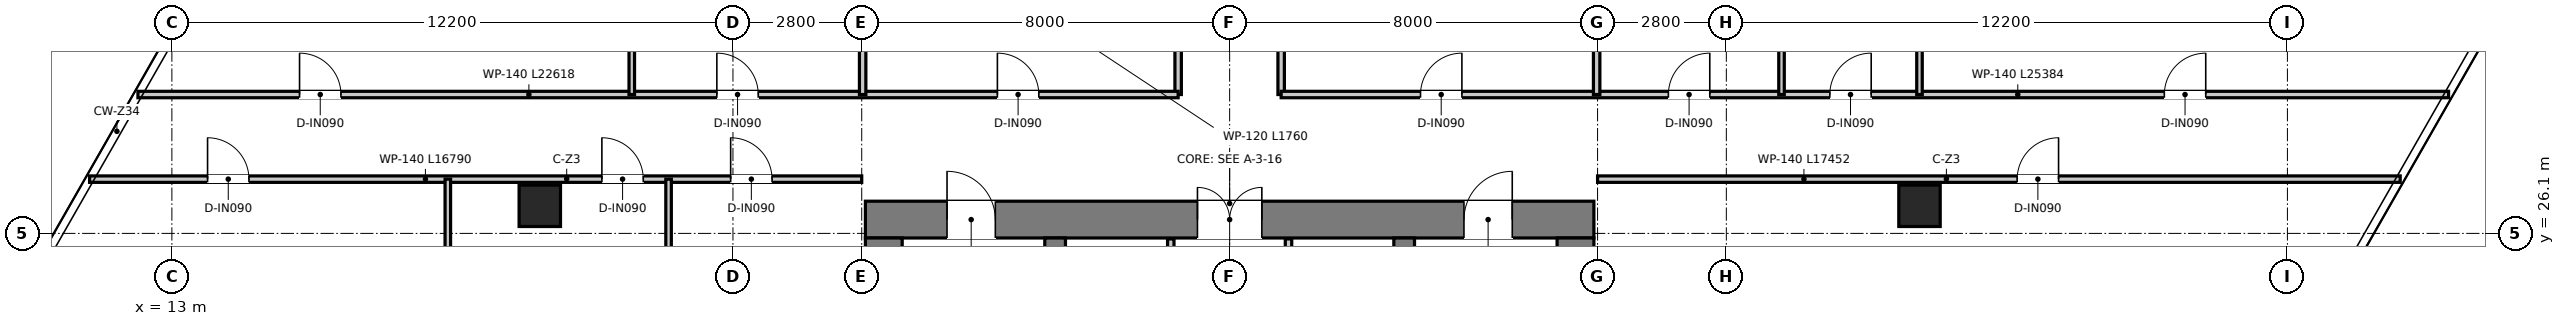
"""IFC4 building model, lengths in metres.
Left out: names, types, materials, properties, quantities, classifications, styles, units other than length and angle.
Written with IfcOpenShell. Run it as: python <this file> out.ifc"""

import sys

from ifc_helpers import new_model, si_unit, direction, frame, frame_2d, origin, origin_2d, place, context, subcontext, project, spatial, rectangle, extrude, source, transform, mapped, element, fill, save


model = new_model("IFC4")
c1 = context("Model", 3, precision=1e-05, world=origin(), true_north=direction((0.0, 1.0)))
c2 = subcontext(c1, "Body", "Model", "MODEL_VIEW")
j1 = project(units=[si_unit("LENGTHUNIT", "METRE"), si_unit("PLANEANGLEUNIT", "RADIAN")], contexts=[c1])
p1 = place(None, origin())
s1 = spatial("IfcSite", under=j1, at=p1, CompositionType="ELEMENT")
p2 = place(p1, origin())
s2 = spatial("IfcBuilding", under=s1, at=p2, CompositionType="ELEMENT")
p3 = place(p2, frame((0.0, 0.0, 169.9)))
s3 = spatial("IfcBuildingStorey", under=s2, at=p3, CompositionType="ELEMENT", Elevation=169.9)
p4 = place(p3, frame((28.08, 26.4, 0.0), z_axis=(0.0, 0.0, 1.0), x_axis=(1.0, 0.0, 0.0)))
e1 = element("IfcWall", 1, at=p4, inside=s3, PredefinedType="SHEAR", context=c2, shape_type="SweptSolid", body=[
    extrude(rectangle(XDim=15.84, YDim=0.8, at=frame_2d((7.92, 0.0))), origin(), (0.0, 0.0, 1.0), 3.95),
])
p5 = place(p4, frame((7.22, 0.0, 0.0)))
e2 = element("IfcOpeningElement", 2, at=p5, cuts=e1, PredefinedType="OPENING", context=c2, shape_type="SweptSolid", body=[
    extrude(rectangle(XDim=1.4, YDim=2.2, at=frame_2d((0.7, 1.1))), frame((0.0, 0.41, 0.0), z_axis=(0.0, -1.0, 0.0), x_axis=(1.0, 0.0, 0.0)), (0.0, 0.0, 1.0), 0.82),
])
p6 = place(p4, frame((1.775, 0.0, 0.0)))
e3 = element("IfcOpeningElement", 3, at=p6, cuts=e1, PredefinedType="OPENING", context=c2, shape_type="SweptSolid", body=[
    extrude(rectangle(XDim=1.05, YDim=2.1, at=frame_2d((0.525, 1.05))), frame((0.0, 0.41, 0.0), z_axis=(0.0, -1.0, 0.0), x_axis=(1.0, 0.0, 0.0)), (0.0, 0.0, 1.0), 0.82),
])
p7 = place(p4, frame((13.015, 0.0, 0.0)))
e4 = element("IfcOpeningElement", 4, at=p7, cuts=e1, PredefinedType="OPENING", context=c2, shape_type="SweptSolid", body=[
    extrude(rectangle(XDim=1.05, YDim=2.1, at=frame_2d((0.525, 1.05))), frame((0.0, 0.41, 0.0), z_axis=(0.0, -1.0, 0.0), x_axis=(1.0, 0.0, 0.0)), (0.0, 0.0, 1.0), 0.82),
])
for number, where, z_axis, x_axis in (
    (5, (28.48, 11.3, 0.0), (0.0, 0.0, 1.0), (0.0, 1.0, 0.0)),
    (6, (43.52, 11.3, 0.0), (0.0, 0.0, 1.0), (0.0, 1.0, 0.0)),
):
    element("IfcWall", number, at=place(p3, frame(where, z_axis=z_axis, x_axis=x_axis)), inside=s3, PredefinedType="SHEAR", context=c2, shape_type="SweptSolid", body=[
        extrude(rectangle(XDim=14.7, YDim=0.8, at=frame_2d((7.35, 0.0))), origin(), (0.0, 0.0, 1.0), 3.95),
    ])
p8 = place(p3, frame((32.205, 13.22, 0.0), z_axis=(0.0, 0.0, 1.0), x_axis=(0.0, 1.0, 0.0)))
e7 = element("IfcWall", 7, at=p8, inside=s3, PredefinedType="SHEAR", context=c2, shape_type="SweptSolid", body=[
    extrude(rectangle(XDim=12.78, YDim=0.45, at=frame_2d((6.39, 0.0))), origin(), (0.0, 0.0, 1.0), 3.95),
])
p9 = place(p8, frame((10.58, 0.0, 0.0)))
e8 = element("IfcOpeningElement", 8, at=p9, cuts=e7, PredefinedType="OPENING", context=c2, shape_type="SweptSolid", body=[
    extrude(rectangle(XDim=1.1, YDim=2.15, at=frame_2d((0.55, 1.075))), frame((0.0, 0.235, 0.0), z_axis=(0.0, -1.0, 0.0), x_axis=(1.0, 0.0, 0.0)), (0.0, 0.0, 1.0), 0.47),
])
p10 = place(p3, frame((39.795, 13.22, 0.0), z_axis=(0.0, 0.0, 1.0), x_axis=(0.0, 1.0, 0.0)))
e9 = element("IfcWall", 9, at=p10, inside=s3, PredefinedType="SHEAR", context=c2, shape_type="SweptSolid", body=[
    extrude(rectangle(XDim=12.78, YDim=0.45, at=frame_2d((6.39, 0.0))), origin(), (0.0, 0.0, 1.0), 3.95),
])
p11 = place(p10, frame((10.58, 0.0, 0.0)))
e10 = element("IfcOpeningElement", 10, at=p11, cuts=e9, PredefinedType="OPENING", context=c2, shape_type="SweptSolid", body=[
    extrude(rectangle(XDim=1.1, YDim=2.15, at=frame_2d((0.55, 1.075))), frame((0.0, 0.235, 0.0), z_axis=(0.0, -1.0, 0.0), x_axis=(1.0, 0.0, 0.0)), (0.0, 0.0, 1.0), 0.47),
])
m1 = source(origin(), c2, "Body", "SweptSolid", [
    extrude(rectangle(XDim=0.9, YDim=0.9, at=origin_2d()), origin(), (0.0, 0.0, 1.0), 3.95),
])
for number, where, z_axis, x_axis in (
    (11, (21.0, 26.7, 0.0), (0.0, 0.0, 1.0), (1.0, 0.0, 0.0)),
    (12, (51.0, 26.7, 0.0), (0.0, 0.0, 1.0), (1.0, 0.0, 0.0)),
):
    element("IfcColumn", number, at=place(p3, frame(where, z_axis=z_axis, x_axis=x_axis)), inside=s3, PredefinedType="COLUMN", context=c2, shape_type="MappedRepresentation", body=[
        mapped(m1, transform((0.0, 0.0, 0.0), x_axis=(1.0, 0.0, 0.0), y_axis=(0.0, 1.0, 0.0), z_axis=(0.0, 0.0, 1.0), scale=1.0)),
    ])
p12 = place(p3, frame((34.72, 20.2, 0.0), z_axis=(0.0, 0.0, 1.0), x_axis=(0.0, 1.0, 0.0)))
e13 = element("IfcWall", 13, at=p12, inside=s3, PredefinedType="PARTITIONING", context=c2, shape_type="SweptSolid", body=[
    extrude(rectangle(XDim=5.78, YDim=0.14, at=frame_2d((2.89, 0.0))), origin(), (0.0, 0.0, 1.0), 2.67),
])
p13 = place(p12, frame((1.05, 0.0, 0.0)))
e14 = element("IfcOpeningElement", 14, at=p13, cuts=e13, PredefinedType="OPENING", context=c2, shape_type="SweptSolid", body=[
    extrude(rectangle(XDim=0.9, YDim=2.1, at=frame_2d((0.45, 1.05))), frame((0.0, 0.08, 0.0), z_axis=(0.0, -1.0, 0.0), x_axis=(1.0, 0.0, 0.0)), (0.0, 0.0, 1.0), 0.16),
])
p14 = place(p3, frame((37.28, 20.2, 0.0), z_axis=(0.0, 0.0, 1.0), x_axis=(0.0, 1.0, 0.0)))
e15 = element("IfcWall", 15, at=p14, inside=s3, PredefinedType="PARTITIONING", context=c2, shape_type="SweptSolid", body=[
    extrude(rectangle(XDim=5.78, YDim=0.14, at=frame_2d((2.89, 0.0))), origin(), (0.0, 0.0, 1.0), 2.67),
])
p15 = place(p14, frame((0.95, 0.0, 0.0)))
e16 = element("IfcOpeningElement", 16, at=p15, cuts=e15, PredefinedType="OPENING", context=c2, shape_type="SweptSolid", body=[
    extrude(rectangle(XDim=1.1, YDim=2.15, at=frame_2d((0.55, 1.075))), frame((0.0, 0.08, 0.0), z_axis=(0.0, -1.0, 0.0), x_axis=(1.0, 0.0, 0.0)), (0.0, 0.0, 1.0), 0.16),
])
p16 = place(p3, frame((34.88, 29.12, 0.0), z_axis=(0.0, 0.0, 1.0), x_axis=(0.0, 1.0, 0.0)))
e17 = element("IfcWall", 17, at=p16, inside=s3, PredefinedType="PARTITIONING", context=c2, shape_type="SweptSolid", body=[
    extrude(rectangle(XDim=11.76, YDim=0.14, at=frame_2d((5.88, 0.0))), origin(), (0.0, 0.0, 1.0), 3.03),
])
p17 = place(p16, frame((4.085, 0.0, 0.0)))
e18 = element("IfcOpeningElement", 18, at=p17, cuts=e17, PredefinedType="OPENING", context=c2, shape_type="SweptSolid", body=[
    extrude(rectangle(XDim=0.95, YDim=2.1, at=frame_2d((0.475, 1.05))), frame((0.0, 0.08, 0.0), z_axis=(0.0, -1.0, 0.0), x_axis=(1.0, 0.0, 0.0)), (0.0, 0.0, 1.0), 0.16),
])
p18 = place(p16, frame((6.82, 0.0, 0.0)))
e19 = element("IfcOpeningElement", 19, at=p18, cuts=e17, PredefinedType="OPENING", context=c2, shape_type="SweptSolid", body=[
    extrude(rectangle(XDim=0.9, YDim=2.1, at=frame_2d((0.45, 1.05))), frame((0.0, 0.08, 0.0), z_axis=(0.0, -1.0, 0.0), x_axis=(1.0, 0.0, 0.0)), (0.0, 0.0, 1.0), 0.16),
])
p19 = place(p16, frame((9.83, 0.0, 0.0)))
e20 = element("IfcOpeningElement", 20, at=p19, cuts=e17, PredefinedType="OPENING", context=c2, shape_type="SweptSolid", body=[
    extrude(rectangle(XDim=0.9, YDim=2.1, at=frame_2d((0.45, 1.05))), frame((0.0, 0.08, 0.0), z_axis=(0.0, -1.0, 0.0), x_axis=(1.0, 0.0, 0.0)), (0.0, 0.0, 1.0), 0.16),
])
p20 = place(p3, frame((37.12, 29.12, 0.0), z_axis=(0.0, 0.0, 1.0), x_axis=(0.0, 1.0, 0.0)))
e21 = element("IfcWall", 21, at=p20, inside=s3, PredefinedType="PARTITIONING", context=c2, shape_type="SweptSolid", body=[
    extrude(rectangle(XDim=11.76, YDim=0.14, at=frame_2d((5.88, 0.0))), origin(), (0.0, 0.0, 1.0), 3.03),
])
p21 = place(p20, frame((3.205, 0.0, 0.0)))
e22 = element("IfcOpeningElement", 22, at=p21, cuts=e21, PredefinedType="OPENING", context=c2, shape_type="SweptSolid", body=[
    extrude(rectangle(XDim=0.95, YDim=2.1, at=frame_2d((0.475, 1.05))), frame((0.0, 0.08, 0.0), z_axis=(0.0, -1.0, 0.0), x_axis=(1.0, 0.0, 0.0)), (0.0, 0.0, 1.0), 0.16),
])
p22 = place(p20, frame((8.02, 0.0, 0.0)))
e23 = element("IfcOpeningElement", 23, at=p22, cuts=e21, PredefinedType="OPENING", context=c2, shape_type="SweptSolid", body=[
    extrude(rectangle(XDim=0.9, YDim=2.1, at=frame_2d((0.45, 1.05))), frame((0.0, 0.08, 0.0), z_axis=(0.0, -1.0, 0.0), x_axis=(1.0, 0.0, 0.0)), (0.0, 0.0, 1.0), 0.16),
])
p23 = place(p3, frame((12.262, 29.12, 0.0), z_axis=(0.0, 0.0, 1.0), x_axis=(1.0, 0.0, 0.0)))
e24 = element("IfcWall", 24, at=p23, inside=s3, PredefinedType="PARTITIONING", context=c2, shape_type="SweptSolid", body=[
    extrude(rectangle(XDim=22.618, YDim=0.14, at=frame_2d((11.309, 0.0))), origin(), (0.0, 0.0, 1.0), 3.03),
])
p24 = place(p23, frame((18.688, 0.0, 0.0)))
e25 = element("IfcOpeningElement", 25, at=p24, cuts=e24, PredefinedType="OPENING", context=c2, shape_type="SweptSolid", body=[
    extrude(rectangle(XDim=0.9, YDim=2.1, at=frame_2d((0.45, 1.05))), frame((0.0, 0.08, 0.0), z_axis=(0.0, -1.0, 0.0), x_axis=(1.0, 0.0, 0.0)), (0.0, 0.0, 1.0), 0.16),
])
p25 = place(p23, frame((3.514, 0.0, 0.0)))
e26 = element("IfcOpeningElement", 26, at=p25, cuts=e24, PredefinedType="OPENING", context=c2, shape_type="SweptSolid", body=[
    extrude(rectangle(XDim=0.9, YDim=2.1, at=frame_2d((0.45, 1.05))), frame((0.0, 0.08, 0.0), z_axis=(0.0, -1.0, 0.0), x_axis=(1.0, 0.0, 0.0)), (0.0, 0.0, 1.0), 0.16),
])
p26 = place(p23, frame((12.588, 0.0, 0.0)))
e27 = element("IfcOpeningElement", 27, at=p26, cuts=e24, PredefinedType="OPENING", context=c2, shape_type="SweptSolid", body=[
    extrude(rectangle(XDim=0.9, YDim=2.1, at=frame_2d((0.45, 1.05))), frame((0.0, 0.08, 0.0), z_axis=(0.0, -1.0, 0.0), x_axis=(1.0, 0.0, 0.0)), (0.0, 0.0, 1.0), 0.16),
])
p27 = place(p3, frame((37.12, 29.12, 0.0), z_axis=(0.0, 0.0, 1.0), x_axis=(1.0, 0.0, 0.0)))
e28 = element("IfcWall", 28, at=p27, inside=s3, PredefinedType="PARTITIONING", context=c2, shape_type="SweptSolid", body=[
    extrude(rectangle(XDim=25.384, YDim=0.14, at=frame_2d((12.692, 0.0))), origin(), (0.0, 0.0, 1.0), 3.03),
])
p28 = place(p27, frame((3.03, 0.0, 0.0)))
e29 = element("IfcOpeningElement", 29, at=p28, cuts=e28, PredefinedType="OPENING", context=c2, shape_type="SweptSolid", body=[
    extrude(rectangle(XDim=0.9, YDim=2.1, at=frame_2d((0.45, 1.05))), frame((0.0, 0.08, 0.0), z_axis=(0.0, -1.0, 0.0), x_axis=(1.0, 0.0, 0.0)), (0.0, 0.0, 1.0), 0.16),
])
p29 = place(p27, frame((8.42, 0.0, 0.0)))
e30 = element("IfcOpeningElement", 30, at=p29, cuts=e28, PredefinedType="OPENING", context=c2, shape_type="SweptSolid", body=[
    extrude(rectangle(XDim=0.9, YDim=2.1, at=frame_2d((0.45, 1.05))), frame((0.0, 0.08, 0.0), z_axis=(0.0, -1.0, 0.0), x_axis=(1.0, 0.0, 0.0)), (0.0, 0.0, 1.0), 0.16),
])
p30 = place(p27, frame((11.93, 0.0, 0.0)))
e31 = element("IfcOpeningElement", 31, at=p30, cuts=e28, PredefinedType="OPENING", context=c2, shape_type="SweptSolid", body=[
    extrude(rectangle(XDim=0.9, YDim=2.1, at=frame_2d((0.45, 1.05))), frame((0.0, 0.08, 0.0), z_axis=(0.0, -1.0, 0.0), x_axis=(1.0, 0.0, 0.0)), (0.0, 0.0, 1.0), 0.16),
])
p31 = place(p27, frame((19.204, 0.0, 0.0)))
e32 = element("IfcOpeningElement", 32, at=p31, cuts=e28, PredefinedType="OPENING", context=c2, shape_type="SweptSolid", body=[
    extrude(rectangle(XDim=0.9, YDim=2.1, at=frame_2d((0.45, 1.05))), frame((0.0, 0.08, 0.0), z_axis=(0.0, -1.0, 0.0), x_axis=(1.0, 0.0, 0.0)), (0.0, 0.0, 1.0), 0.16),
])
p32 = place(p3, frame((11.21, 27.28, 0.0), z_axis=(0.0, 0.0, 1.0), x_axis=(1.0, 0.0, 0.0)))
e33 = element("IfcWall", 33, at=p32, inside=s3, PredefinedType="PARTITIONING", context=c2, shape_type="SweptSolid", body=[
    extrude(rectangle(XDim=16.79, YDim=0.14, at=frame_2d((8.395, 0.0))), origin(), (0.0, 0.0, 1.0), 3.03),
])
p33 = place(p32, frame((2.565, 0.0, 0.0)))
e34 = element("IfcOpeningElement", 34, at=p33, cuts=e33, PredefinedType="OPENING", context=c2, shape_type="SweptSolid", body=[
    extrude(rectangle(XDim=0.9, YDim=2.1, at=frame_2d((0.45, 1.05))), frame((0.0, 0.08, 0.0), z_axis=(0.0, -1.0, 0.0), x_axis=(1.0, 0.0, 0.0)), (0.0, 0.0, 1.0), 0.16),
])
p34 = place(p32, frame((11.139, 0.0, 0.0)))
e35 = element("IfcOpeningElement", 35, at=p34, cuts=e33, PredefinedType="OPENING", context=c2, shape_type="SweptSolid", body=[
    extrude(rectangle(XDim=0.9, YDim=2.1, at=frame_2d((0.45, 1.05))), frame((0.0, 0.08, 0.0), z_axis=(0.0, -1.0, 0.0), x_axis=(1.0, 0.0, 0.0)), (0.0, 0.0, 1.0), 0.16),
])
p35 = place(p32, frame((13.939, 0.0, 0.0)))
e36 = element("IfcOpeningElement", 36, at=p35, cuts=e33, PredefinedType="OPENING", context=c2, shape_type="SweptSolid", body=[
    extrude(rectangle(XDim=0.9, YDim=2.1, at=frame_2d((0.45, 1.05))), frame((0.0, 0.08, 0.0), z_axis=(0.0, -1.0, 0.0), x_axis=(1.0, 0.0, 0.0)), (0.0, 0.0, 1.0), 0.16),
])
p36 = place(p3, frame((44.0, 27.28, 0.0), z_axis=(0.0, 0.0, 1.0), x_axis=(1.0, 0.0, 0.0)))
e37 = element("IfcWall", 37, at=p36, inside=s3, PredefinedType="PARTITIONING", context=c2, shape_type="SweptSolid", body=[
    extrude(rectangle(XDim=17.452, YDim=0.14, at=frame_2d((8.726, 0.0))), origin(), (0.0, 0.0, 1.0), 3.03),
])
p37 = place(p36, frame((9.124, 0.0, 0.0)))
e38 = element("IfcOpeningElement", 38, at=p37, cuts=e37, PredefinedType="OPENING", context=c2, shape_type="SweptSolid", body=[
    extrude(rectangle(XDim=0.9, YDim=2.1, at=frame_2d((0.45, 1.05))), frame((0.0, 0.08, 0.0), z_axis=(0.0, -1.0, 0.0), x_axis=(1.0, 0.0, 0.0)), (0.0, 0.0, 1.0), 0.16),
])
for number, where, z_axis, x_axis in (
    (39, (28.02, 29.12, 0.0), (0.0, 0.0, 1.0), (0.0, 1.0, 0.0)),
    (40, (43.98, 29.12, 0.0), (0.0, 0.0, 1.0), (0.0, 1.0, 0.0)),
):
    element("IfcWall", number, at=place(p3, frame(where, z_axis=z_axis, x_axis=x_axis)), inside=s3, PredefinedType="PARTITIONING", context=c2, shape_type="SweptSolid", body=[
        extrude(rectangle(XDim=5.46, YDim=0.14, at=frame_2d((2.73, 0.0))), origin(), (0.0, 0.0, 1.0), 3.31),
    ])
p38 = place(p3, frame((23.0, 29.12, 0.0), z_axis=(0.0, 0.0, 1.0), x_axis=(0.0, 1.0, 0.0)))
e41 = element("IfcWall", 41, at=p38, inside=s3, PredefinedType="PARTITIONING", context=c2, shape_type="SweptSolid", body=[
    extrude(rectangle(XDim=18.787, YDim=0.12, at=frame_2d((9.394, 0.0))), origin(), (0.0, 0.0, 1.0), 3.08),
])
p39 = place(p3, frame((48.0, 29.12, 0.0), z_axis=(0.0, 0.0, 1.0), x_axis=(0.0, 1.0, 0.0)))
e42 = element("IfcWall", 42, at=p39, inside=s3, PredefinedType="PARTITIONING", context=c2, shape_type="SweptSolid", body=[
    extrude(rectangle(XDim=15.842, YDim=0.12, at=frame_2d((7.921, 0.0))), origin(), (0.0, 0.0, 1.0), 3.08),
])
p40 = place(p3, frame((51.0, 29.12, 0.0), z_axis=(0.0, 0.0, 1.0), x_axis=(0.0, 1.0, 0.0)))
e43 = element("IfcWall", 43, at=p40, inside=s3, PredefinedType="PARTITIONING", context=c2, shape_type="SweptSolid", body=[
    extrude(rectangle(XDim=14.128, YDim=0.12, at=frame_2d((7.064, 0.0))), origin(), (0.0, 0.0, 1.0), 3.08),
])
p41 = place(p3, frame((19.0, 11.295, 0.0), z_axis=(0.0, 0.0, 1.0), x_axis=(0.0, 1.0, 0.0)))
e44 = element("IfcWall", 44, at=p41, inside=s3, PredefinedType="PARTITIONING", context=c2, shape_type="SweptSolid", body=[
    extrude(rectangle(XDim=15.985, YDim=0.12, at=frame_2d((7.992, 0.0))), origin(), (0.0, 0.0, 1.0), 3.67),
])
p42 = place(p3, frame((23.8, 8.552, 0.0), z_axis=(0.0, 0.0, 1.0), x_axis=(0.0, 1.0, 0.0)))
e45 = element("IfcWall", 45, at=p42, inside=s3, PredefinedType="PARTITIONING", context=c2, shape_type="SweptSolid", body=[
    extrude(rectangle(XDim=18.728, YDim=0.12, at=frame_2d((9.364, 0.0))), origin(), (0.0, 0.0, 1.0), 3.08),
])
p43 = place(p5, origin())
e46 = element("IfcDoor", 46, at=p43, inside=s3, OperationType="DOUBLE_DOOR_SINGLE_SWING", PredefinedType="DOOR", context=c2, shape_type="SweptSolid", body=[
    extrude(rectangle(XDim=1.4, YDim=2.2, at=frame_2d((0.7, 1.1))), frame((0.0, 0.025, 0.0), z_axis=(0.0, -1.0, 0.0), x_axis=(1.0, 0.0, 0.0)), (0.0, 0.0, 1.0), 0.05),
])
fill(e2, e46)
p44 = place(p6, origin())
e47 = element("IfcDoor", 47, at=p44, inside=s3, OperationType="SINGLE_SWING_LEFT", PredefinedType="DOOR", context=c2, shape_type="SweptSolid", body=[
    extrude(rectangle(XDim=1.05, YDim=2.1, at=frame_2d((0.525, 1.05))), frame((0.0, 0.025, 0.0), z_axis=(0.0, -1.0, 0.0), x_axis=(1.0, 0.0, 0.0)), (0.0, 0.0, 1.0), 0.05),
])
fill(e3, e47)
p45 = place(p7, origin())
e48 = element("IfcDoor", 48, at=p45, inside=s3, OperationType="SINGLE_SWING_RIGHT", PredefinedType="DOOR", context=c2, shape_type="SweptSolid", body=[
    extrude(rectangle(XDim=1.05, YDim=2.1, at=frame_2d((0.525, 1.05))), frame((0.0, 0.025, 0.0), z_axis=(0.0, -1.0, 0.0), x_axis=(1.0, 0.0, 0.0)), (0.0, 0.0, 1.0), 0.05),
])
fill(e4, e48)
p46 = place(p24, origin())
e49 = element("IfcDoor", 49, at=p46, inside=s3, OperationType="SINGLE_SWING_LEFT", PredefinedType="DOOR", context=c2, shape_type="SweptSolid", body=[
    extrude(rectangle(XDim=0.9, YDim=2.1, at=frame_2d((0.45, 1.05))), frame((0.0, 0.025, 0.0), z_axis=(0.0, -1.0, 0.0), x_axis=(1.0, 0.0, 0.0)), (0.0, 0.0, 1.0), 0.05),
])
fill(e25, e49)
p47 = place(p28, origin())
e50 = element("IfcDoor", 50, at=p47, inside=s3, OperationType="SINGLE_SWING_RIGHT", PredefinedType="DOOR", context=c2, shape_type="SweptSolid", body=[
    extrude(rectangle(XDim=0.9, YDim=2.1, at=frame_2d((0.45, 1.05))), frame((0.0, 0.025, 0.0), z_axis=(0.0, -1.0, 0.0), x_axis=(1.0, 0.0, 0.0)), (0.0, 0.0, 1.0), 0.05),
])
fill(e29, e50)
p48 = place(p25, origin())
e51 = element("IfcDoor", 51, at=p48, inside=s3, OperationType="SINGLE_SWING_LEFT", PredefinedType="DOOR", context=c2, shape_type="SweptSolid", body=[
    extrude(rectangle(XDim=0.9, YDim=2.1, at=frame_2d((0.45, 1.05))), frame((0.0, 0.025, 0.0), z_axis=(0.0, -1.0, 0.0), x_axis=(1.0, 0.0, 0.0)), (0.0, 0.0, 1.0), 0.05),
])
fill(e26, e51)
p49 = place(p26, origin())
e52 = element("IfcDoor", 52, at=p49, inside=s3, OperationType="SINGLE_SWING_LEFT", PredefinedType="DOOR", context=c2, shape_type="SweptSolid", body=[
    extrude(rectangle(XDim=0.9, YDim=2.1, at=frame_2d((0.45, 1.05))), frame((0.0, 0.025, 0.0), z_axis=(0.0, -1.0, 0.0), x_axis=(1.0, 0.0, 0.0)), (0.0, 0.0, 1.0), 0.05),
])
fill(e27, e52)
p50 = place(p29, origin())
e53 = element("IfcDoor", 53, at=p50, inside=s3, OperationType="SINGLE_SWING_RIGHT", PredefinedType="DOOR", context=c2, shape_type="SweptSolid", body=[
    extrude(rectangle(XDim=0.9, YDim=2.1, at=frame_2d((0.45, 1.05))), frame((0.0, 0.025, 0.0), z_axis=(0.0, -1.0, 0.0), x_axis=(1.0, 0.0, 0.0)), (0.0, 0.0, 1.0), 0.05),
])
fill(e30, e53)
p51 = place(p30, origin())
e54 = element("IfcDoor", 54, at=p51, inside=s3, OperationType="SINGLE_SWING_RIGHT", PredefinedType="DOOR", context=c2, shape_type="SweptSolid", body=[
    extrude(rectangle(XDim=0.9, YDim=2.1, at=frame_2d((0.45, 1.05))), frame((0.0, 0.025, 0.0), z_axis=(0.0, -1.0, 0.0), x_axis=(1.0, 0.0, 0.0)), (0.0, 0.0, 1.0), 0.05),
])
fill(e31, e54)
p52 = place(p31, origin())
e55 = element("IfcDoor", 55, at=p52, inside=s3, OperationType="SINGLE_SWING_RIGHT", PredefinedType="DOOR", context=c2, shape_type="SweptSolid", body=[
    extrude(rectangle(XDim=0.9, YDim=2.1, at=frame_2d((0.45, 1.05))), frame((0.0, 0.025, 0.0), z_axis=(0.0, -1.0, 0.0), x_axis=(1.0, 0.0, 0.0)), (0.0, 0.0, 1.0), 0.05),
])
fill(e32, e55)
p53 = place(p33, origin())
e56 = element("IfcDoor", 56, at=p53, inside=s3, OperationType="SINGLE_SWING_LEFT", PredefinedType="DOOR", context=c2, shape_type="SweptSolid", body=[
    extrude(rectangle(XDim=0.9, YDim=2.1, at=frame_2d((0.45, 1.05))), frame((0.0, 0.025, 0.0), z_axis=(0.0, -1.0, 0.0), x_axis=(1.0, 0.0, 0.0)), (0.0, 0.0, 1.0), 0.05),
])
fill(e34, e56)
p54 = place(p34, origin())
e57 = element("IfcDoor", 57, at=p54, inside=s3, OperationType="SINGLE_SWING_LEFT", PredefinedType="DOOR", context=c2, shape_type="SweptSolid", body=[
    extrude(rectangle(XDim=0.9, YDim=2.1, at=frame_2d((0.45, 1.05))), frame((0.0, 0.025, 0.0), z_axis=(0.0, -1.0, 0.0), x_axis=(1.0, 0.0, 0.0)), (0.0, 0.0, 1.0), 0.05),
])
fill(e35, e57)
p55 = place(p35, origin())
e58 = element("IfcDoor", 58, at=p55, inside=s3, OperationType="SINGLE_SWING_LEFT", PredefinedType="DOOR", context=c2, shape_type="SweptSolid", body=[
    extrude(rectangle(XDim=0.9, YDim=2.1, at=frame_2d((0.45, 1.05))), frame((0.0, 0.025, 0.0), z_axis=(0.0, -1.0, 0.0), x_axis=(1.0, 0.0, 0.0)), (0.0, 0.0, 1.0), 0.05),
])
fill(e36, e58)
p56 = place(p37, origin())
e59 = element("IfcDoor", 59, at=p56, inside=s3, OperationType="SINGLE_SWING_RIGHT", PredefinedType="DOOR", context=c2, shape_type="SweptSolid", body=[
    extrude(rectangle(XDim=0.9, YDim=2.1, at=frame_2d((0.45, 1.05))), frame((0.0, 0.025, 0.0), z_axis=(0.0, -1.0, 0.0), x_axis=(1.0, 0.0, 0.0)), (0.0, 0.0, 1.0), 0.05),
])
fill(e38, e59)
save(model, sys.argv[1])
